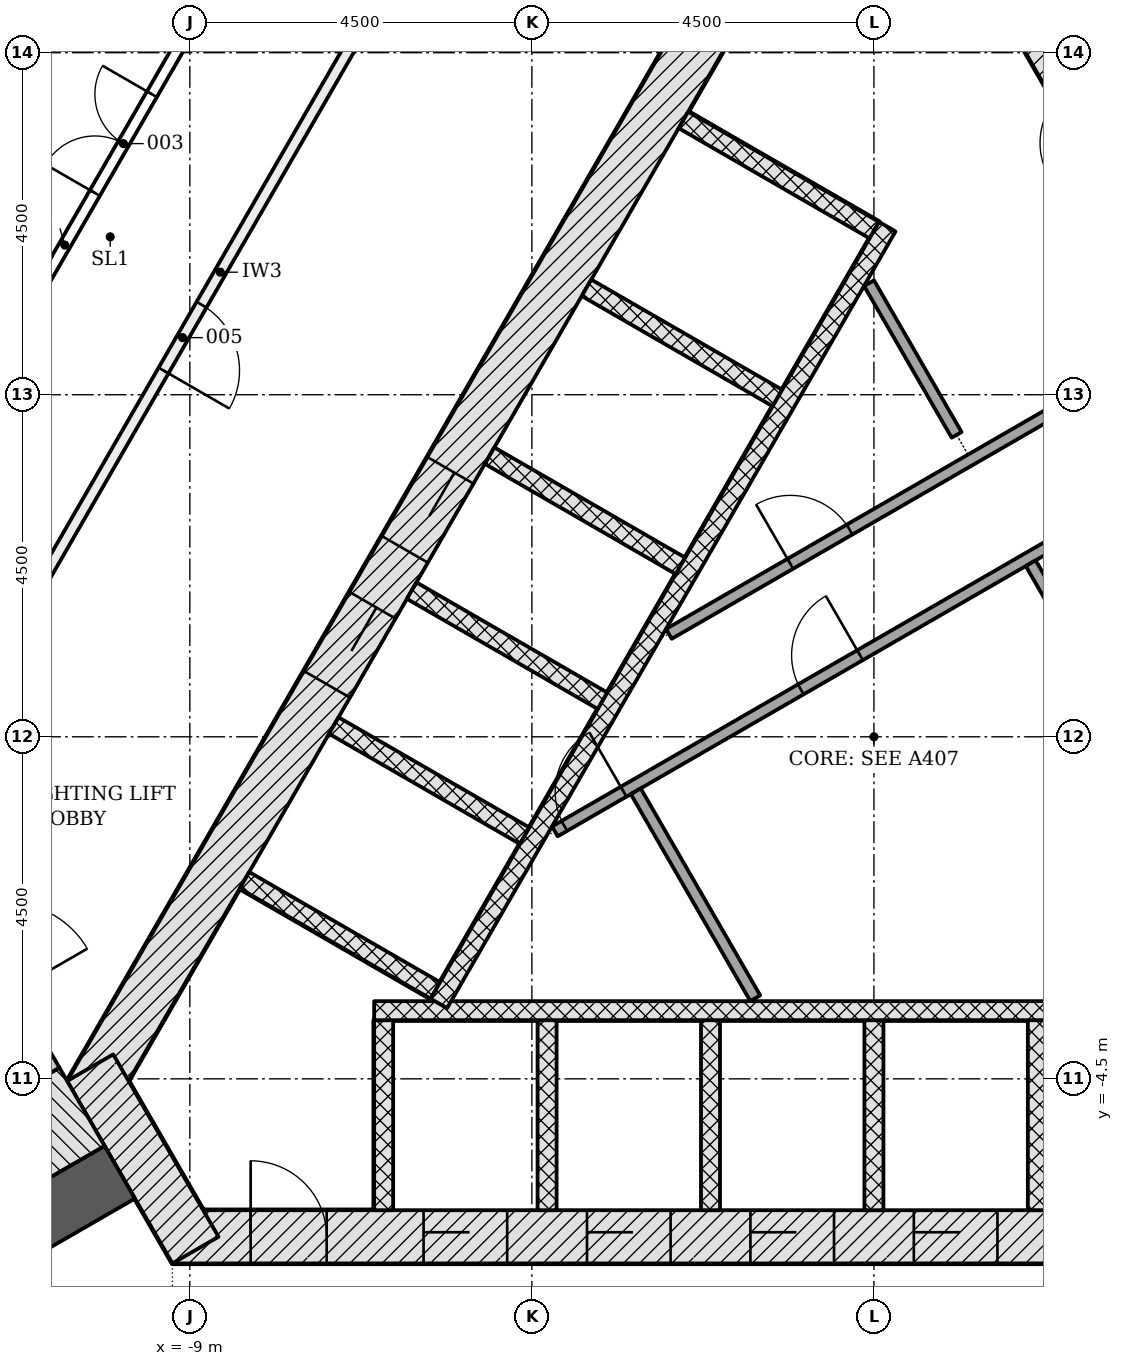
"""IFC4 building model, lengths in metres.
Left out: names, types, materials, properties, quantities, classifications, styles, units other than length and angle.
Written with IfcOpenShell. Run it as: python <this file> out.ifc"""

import sys

from ifc_helpers import new_model, si_unit, direction, frame, frame_2d, origin, place, context, subcontext, project, spatial, polyline, rectangle, outline, extrude, element, fill, save


model = new_model("IFC4")
c1 = context("Model", 3, precision=1e-05, world=origin(), true_north=direction((0.0, 1.0)))
c2 = subcontext(c1, "Body", "Model", "MODEL_VIEW")
j1 = project(units=[si_unit("LENGTHUNIT", "METRE"), si_unit("PLANEANGLEUNIT", "RADIAN")], contexts=[c1])
p1 = place(None, origin())
s1 = spatial("IfcSite", under=j1, at=p1, CompositionType="ELEMENT")
p2 = place(p1, origin())
s2 = spatial("IfcBuilding", under=s1, at=p2, CompositionType="ELEMENT")
p3 = place(p2, frame((0.0, 0.0, 105.9)))
s3 = spatial("IfcBuildingStorey", under=s2, at=p3, CompositionType="ELEMENT", Elevation=105.9)
p4 = place(p3, frame((-9.229, -6.578, -0.2), z_axis=(0.0, 0.0, 1.0), x_axis=(1.0, 0.0, 0.0)))
e1 = element("IfcWall", 1, at=p4, inside=s3, PredefinedType="SHEAR", context=c2, shape_type="SweptSolid", body=[
    extrude(rectangle(XDim=18.458, YDim=0.7, at=frame_2d((9.229, 0.0))), origin(), (0.0, 0.0, 1.0), 3.6),
])
p5 = place(p4, frame((3.304, 0.0, 0.2)))
e2 = element("IfcOpeningElement", 2, at=p5, cuts=e1, PredefinedType="OPENING", context=c2, shape_type="SweptSolid", body=[
    extrude(rectangle(XDim=1.1, YDim=2.1, at=frame_2d((0.55, 1.05))), frame((0.0, 0.36, 0.0), z_axis=(0.0, -1.0, 0.0), x_axis=(1.0, 0.0, 0.0)), (0.0, 0.0, 1.0), 0.72),
])
p6 = place(p4, frame((5.454, 0.0, 0.2)))
e3 = element("IfcOpeningElement", 3, at=p6, cuts=e1, PredefinedType="OPENING", context=c2, shape_type="SweptSolid", body=[
    extrude(rectangle(XDim=1.1, YDim=2.1, at=frame_2d((0.55, 1.05))), frame((0.0, 0.36, 0.0), z_axis=(0.0, -1.0, 0.0), x_axis=(1.0, 0.0, 0.0)), (0.0, 0.0, 1.0), 0.72),
])
p7 = place(p4, frame((7.604, 0.0, 0.2)))
e4 = element("IfcOpeningElement", 4, at=p7, cuts=e1, PredefinedType="OPENING", context=c2, shape_type="SweptSolid", body=[
    extrude(rectangle(XDim=1.1, YDim=2.1, at=frame_2d((0.55, 1.05))), frame((0.0, 0.36, 0.0), z_axis=(0.0, -1.0, 0.0), x_axis=(1.0, 0.0, 0.0)), (0.0, 0.0, 1.0), 0.72),
])
p8 = place(p4, frame((9.754, 0.0, 0.2)))
e5 = element("IfcOpeningElement", 5, at=p8, cuts=e1, PredefinedType="OPENING", context=c2, shape_type="SweptSolid", body=[
    extrude(rectangle(XDim=1.1, YDim=2.1, at=frame_2d((0.55, 1.05))), frame((0.0, 0.36, 0.0), z_axis=(0.0, -1.0, 0.0), x_axis=(1.0, 0.0, 0.0)), (0.0, 0.0, 1.0), 0.72),
])
p9 = place(p4, frame((11.904, 0.0, 0.2)))
e6 = element("IfcOpeningElement", 6, at=p9, cuts=e1, PredefinedType="OPENING", context=c2, shape_type="SweptSolid", body=[
    extrude(rectangle(XDim=1.1, YDim=2.1, at=frame_2d((0.55, 1.05))), frame((0.0, 0.36, 0.0), z_axis=(0.0, -1.0, 0.0), x_axis=(1.0, 0.0, 0.0)), (0.0, 0.0, 1.0), 0.72),
])
p10 = place(p4, frame((14.054, 0.0, 0.2)))
e7 = element("IfcOpeningElement", 7, at=p10, cuts=e1, PredefinedType="OPENING", context=c2, shape_type="SweptSolid", body=[
    extrude(rectangle(XDim=1.1, YDim=2.1, at=frame_2d((0.55, 1.05))), frame((0.0, 0.36, 0.0), z_axis=(0.0, -1.0, 0.0), x_axis=(1.0, 0.0, 0.0)), (0.0, 0.0, 1.0), 0.72),
])
p11 = place(p4, frame((1.029, 0.0, 0.2)))
e8 = element("IfcOpeningElement", 8, at=p11, cuts=e1, PredefinedType="OPENING", context=c2, shape_type="SweptSolid", body=[
    extrude(rectangle(XDim=1.0, YDim=2.1, at=frame_2d((0.5, 1.05))), frame((0.0, 0.36, 0.0), z_axis=(0.0, -1.0, 0.0), x_axis=(1.0, 0.0, 0.0)), (0.0, 0.0, 1.0), 0.72),
])
p12 = place(p3, frame((10.311, -4.703, -0.2), z_axis=(0.0, 0.0, 1.0), x_axis=(-0.500001446645, 0.866024568562, 0.0)))
e9 = element("IfcWall", 9, at=p12, inside=s3, PredefinedType="SHEAR", context=c2, shape_type="SweptSolid", body=[
    extrude(rectangle(XDim=18.458, YDim=0.7, at=frame_2d((9.229, 0.0))), origin(), (0.0, 0.0, 1.0), 3.6),
])
p13 = place(p12, frame((10.5, 0.0, 0.2)))
e10 = element("IfcOpeningElement", 10, at=p13, cuts=e9, PredefinedType="OPENING", context=c2, shape_type="SweptSolid", body=[
    extrude(rectangle(XDim=1.0, YDim=2.1, at=frame_2d((0.5, 1.05))), frame((0.0, 0.36, 0.0), z_axis=(0.0, -1.0, 0.0), x_axis=(1.0, 0.0, 0.0)), (0.0, 0.0, 1.0), 0.72),
])
p14 = place(p12, frame((4.877, 0.0, 0.2)))
e11 = element("IfcOpeningElement", 11, at=p14, cuts=e9, PredefinedType="OPENING", context=c2, shape_type="SweptSolid", body=[
    extrude(rectangle(XDim=0.9, YDim=2.1, at=frame_2d((0.45, 1.05))), frame((0.0, 0.36, 0.0), z_axis=(0.0, -1.0, 0.0), x_axis=(1.0, 0.0, 0.0)), (0.0, 0.0, 1.0), 0.72),
])
p15 = place(p12, frame((14.452, 0.0, 0.2)))
e12 = element("IfcOpeningElement", 12, at=p15, cuts=e9, PredefinedType="OPENING", context=c2, shape_type="SweptSolid", body=[
    extrude(rectangle(XDim=0.9, YDim=2.1, at=frame_2d((0.45, 1.05))), frame((0.0, 0.36, 0.0), z_axis=(0.0, -1.0, 0.0), x_axis=(1.0, 0.0, 0.0)), (0.0, 0.0, 1.0), 0.72),
])
p16 = place(p3, frame((-1.083, 11.281, -0.2), z_axis=(0.0, 0.0, 1.0), x_axis=(-0.500001446645, -0.866024568562, 0.0)))
e13 = element("IfcWall", 13, at=p16, inside=s3, PredefinedType="SHEAR", context=c2, shape_type="SweptSolid", body=[
    extrude(rectangle(XDim=18.458, YDim=0.7, at=frame_2d((9.229, 0.0))), origin(), (0.0, 0.0, 1.0), 3.6),
])
p17 = place(p16, frame((8.979, 0.0, 0.2)))
e14 = element("IfcOpeningElement", 14, at=p17, cuts=e13, PredefinedType="OPENING", context=c2, shape_type="SweptSolid", body=[
    extrude(rectangle(XDim=1.2, YDim=2.1, at=frame_2d((0.6, 1.05))), frame((0.0, 0.36, 0.0), z_axis=(0.0, -1.0, 0.0), x_axis=(1.0, 0.0, 0.0)), (0.0, 0.0, 1.0), 0.72),
])
p18 = place(p16, frame((11.029, 0.0, 0.2)))
e15 = element("IfcOpeningElement", 15, at=p18, cuts=e13, PredefinedType="OPENING", context=c2, shape_type="SweptSolid", body=[
    extrude(rectangle(XDim=1.2, YDim=2.1, at=frame_2d((0.6, 1.05))), frame((0.0, 0.36, 0.0), z_axis=(0.0, -1.0, 0.0), x_axis=(1.0, 0.0, 0.0)), (0.0, 0.0, 1.0), 0.72),
])
p19 = place(p3, frame((-10.311, -4.353, -0.2), z_axis=(0.0, 0.0, 1.0), x_axis=(0.500042739161, -0.866000726912, 0.0)))
e16 = element("IfcWall", 16, at=p19, inside=s3, PredefinedType="SHEAR", context=c2, shape_type="SweptSolid", body=[
    extrude(rectangle(XDim=2.771, YDim=0.7, at=frame_2d((1.386, 0.0))), origin(), (0.0, 0.0, 1.0), 3.6),
])
p20 = place(p3, frame((-9.922, -5.728, -0.2), z_axis=(0.0, 0.0, 1.0), x_axis=(-0.866027307971, -0.499996701837, 0.0)))
e17 = element("IfcWall", 17, at=p20, inside=s3, PredefinedType="SHEAR", context=c2, shape_type="SweptSolid", body=[
    extrude(rectangle(XDim=11.918, YDim=0.8, at=frame_2d((5.959, 0.0))), origin(), (0.0, 0.0, 1.0), 3.6),
])
p21 = place(p3, origin())
e18 = element("IfcWall", 18, at=p21, inside=s3, PredefinedType="PARAPET", context=c2, shape_type="SweptSolid", body=[
    extrude(outline(polyline([(-3.375, 26.953), (-5.966, 28.358), (-8.687, 29.371), (-11.446, 29.958), (-14.148, 30.099), (-16.702, 29.789), (-19.02, 29.039), (-21.024, 27.873), (-22.646, 26.333), (-23.83, 24.469), (-24.536, 22.347), (-24.74, 20.038), (-24.435, 17.62), (-23.631, 15.176), (-22.356, 12.79), (-20.653, 10.542), (-18.58, 8.509), (-16.208, 6.76), (-16.06, 6.961), (-18.418, 8.699), (-20.465, 10.707), (-22.145, 12.925), (-23.4, 15.275), (-24.19, 17.675), (-24.489, 20.042), (-24.29, 22.296), (-23.603, 24.362), (-22.452, 26.173), (-20.873, 27.672), (-18.918, 28.809), (-16.647, 29.544), (-14.139, 29.848), (-11.478, 29.709), (-8.757, 29.13), (-6.07, 28.129), (-3.495, 26.733), (-3.375, 26.953)])), origin(), (0.0, 0.0, 1.0), 1.1),
])
for number, where, z_axis, x_axis in (
    (19, (-6.45, -6.228, -0.2), (0.0, 0.0, 1.0), (0.0, 1.0, 0.0)),
    (20, (-4.3, -6.228, -0.2), (0.0, 0.0, 1.0), (0.0, 1.0, 0.0)),
    (21, (-2.15, -6.228, -0.2), (0.0, 0.0, 1.0), (0.0, 1.0, 0.0)),
    (22, (0.0, -6.228, -0.2), (0.0, 0.0, 1.0), (0.0, 1.0, 0.0)),
    (23, (2.15, -6.228, -0.2), (0.0, 0.0, 1.0), (0.0, 1.0, 0.0)),
):
    element("IfcWall", number, at=place(p3, frame(where, z_axis=z_axis, x_axis=x_axis)), inside=s3, PredefinedType="PARTITIONING", context=c2, shape_type="SweptSolid", body=[
        extrude(rectangle(XDim=2.5, YDim=0.25, at=frame_2d((1.25, 0.0))), origin(), (0.0, 0.0, 1.0), 3.6),
    ])
p22 = place(p3, frame((-6.575, -3.603, 0.0), z_axis=(0.0, 0.0, 1.0), x_axis=(1.0, 0.0, 0.0)))
e24 = element("IfcWall", 24, at=p22, inside=s3, PredefinedType="PARTITIONING", context=c2, shape_type="SweptSolid", body=[
    extrude(rectangle(XDim=13.15, YDim=0.25, at=frame_2d((6.575, 0.0))), origin(), (0.0, 0.0, 1.0), 3.4),
])
p23 = place(p3, frame((-2.506, 8.115, -0.2), z_axis=(0.0, 0.0, 1.0), x_axis=(0.865996321171, -0.50005036918, 0.0)))
e25 = element("IfcWall", 25, at=p23, inside=s3, PredefinedType="PARTITIONING", context=c2, shape_type="SweptSolid", body=[
    extrude(rectangle(XDim=2.9, YDim=0.25, at=frame_2d((1.45, 0.0))), origin(), (0.0, 0.0, 1.0), 3.6),
])
for number, where, z_axis, x_axis in (
    (26, (-3.781, 5.907, -0.2), (0.0, 0.0, 1.0), (0.866, -0.5, 0.0)),
    (27, (-5.056, 3.699, -0.2), (0.0, 0.0, 1.0), (0.866, -0.5, 0.0)),
    (28, (-6.081, 1.923, -0.2), (0.0, 0.0, 1.0), (0.866, -0.5, 0.0)),
    (29, (-7.106, 0.148, -0.2), (0.0, 0.0, 1.0), (0.866, -0.5, 0.0)),
    (30, (-8.281, -1.887, -0.2), (0.0, 0.0, 1.0), (0.866, -0.5, 0.0)),
):
    element("IfcWall", number, at=place(p3, frame(where, z_axis=z_axis, x_axis=x_axis)), inside=s3, PredefinedType="PARTITIONING", context=c2, shape_type="SweptSolid", body=[
        extrude(rectangle(XDim=2.9, YDim=0.25, at=frame_2d((1.45, 0.0))), origin(), (0.0, 0.0, 1.0), 3.6),
    ])
p24 = place(p3, frame((0.176, 6.711, 0.0), z_axis=(0.0, 0.0, 1.0), x_axis=(-0.500004227369, -0.866022963098, 0.0)))
e31 = element("IfcWall", 31, at=p24, inside=s3, PredefinedType="PARTITIONING", context=c2, shape_type="SweptSolid", body=[
    extrude(rectangle(XDim=11.8, YDim=0.25, at=frame_2d((5.9, 0.0))), origin(), (0.0, 0.0, 1.0), 3.4),
])
p25 = place(p3, frame((-4.198, -1.244, 0.0), z_axis=(0.0, 0.0, 1.0), x_axis=(0.866020798945, 0.500007975732, 0.0)))
e32 = element("IfcWall", 32, at=p25, inside=s3, PredefinedType="PARTITIONING", context=c2, shape_type="SweptSolid", body=[
    extrude(rectangle(XDim=10.486, YDim=0.15, at=frame_2d((5.243, 0.0))), origin(), (0.0, 0.0, 1.0), 3.4),
])
p26 = place(p25, frame((3.736, 0.0, 0.0)))
e33 = element("IfcOpeningElement", 33, at=p26, cuts=e32, PredefinedType="OPENING", context=c2, shape_type="SweptSolid", body=[
    extrude(rectangle(XDim=0.9, YDim=2.1, at=frame_2d((0.45, 1.05))), frame((0.0, 0.085, 0.0), z_axis=(0.0, -1.0, 0.0), x_axis=(1.0, 0.0, 0.0)), (0.0, 0.0, 1.0), 0.17),
])
p27 = place(p25, frame((0.144, 0.0, 0.0)))
e34 = element("IfcOpeningElement", 34, at=p27, cuts=e32, PredefinedType="OPENING", context=c2, shape_type="SweptSolid", body=[
    extrude(rectangle(XDim=0.9, YDim=2.1, at=frame_2d((0.45, 1.05))), frame((0.0, 0.085, 0.0), z_axis=(0.0, -1.0, 0.0), x_axis=(1.0, 0.0, 0.0)), (0.0, 0.0, 1.0), 0.17),
])
p28 = place(p3, frame((5.367, -3.439, 0.0), z_axis=(0.0, 0.0, 1.0), x_axis=(-0.499981499682, 0.866036084685, 0.0)))
e35 = element("IfcWall", 35, at=p28, inside=s3, PredefinedType="PARTITIONING", context=c2, shape_type="SweptSolid", body=[
    extrude(rectangle(XDim=6.608, YDim=0.15, at=frame_2d((3.304, 0.0))), origin(), (0.0, 0.0, 1.0), 3.4),
])
p29 = place(p3, frame((-1.561, -3.439, 0.0), z_axis=(0.0, 0.0, 1.0), x_axis=(-0.499989077369, 0.866031709877, 0.0)))
e36 = element("IfcWall", 36, at=p29, inside=s3, PredefinedType="PARTITIONING", context=c2, shape_type="SweptSolid", body=[
    extrude(rectangle(XDim=3.144, YDim=0.15, at=frame_2d((1.572, 0.0))), origin(), (0.0, 0.0, 1.0), 3.4),
])
p30 = place(p3, frame((-2.698, 1.354, 0.0), z_axis=(0.0, 0.0, 1.0), x_axis=(0.866021157486, 0.500007354732, 0.0)))
e37 = element("IfcWall", 37, at=p30, inside=s3, PredefinedType="PARTITIONING", context=c2, shape_type="SweptSolid", body=[
    extrude(rectangle(XDim=7.888, YDim=0.15, at=frame_2d((3.944, 0.0))), origin(), (0.0, 0.0, 1.0), 3.4),
])
p31 = place(p30, frame((1.845, 0.0, 0.0)))
e38 = element("IfcOpeningElement", 38, at=p31, cuts=e37, PredefinedType="OPENING", context=c2, shape_type="SweptSolid", body=[
    extrude(rectangle(XDim=0.9, YDim=2.1, at=frame_2d((0.45, 1.05))), frame((0.0, 0.085, 0.0), z_axis=(0.0, -1.0, 0.0), x_axis=(1.0, 0.0, 0.0)), (0.0, 0.0, 1.0), 0.17),
])
p32 = place(p3, frame((1.088, 3.972, 0.0), z_axis=(0.0, 0.0, 1.0), x_axis=(-0.500116913307, 0.865957893332, 0.0)))
e39 = element("IfcWall", 39, at=p32, inside=s3, PredefinedType="PARTITIONING", context=c2, shape_type="SweptSolid", body=[
    extrude(rectangle(XDim=2.304, YDim=0.15, at=frame_2d((1.152, 0.0))), origin(), (0.0, 0.0, 1.0), 3.4),
])
p33 = place(p3, frame((-12.576, -1.331, -0.2), z_axis=(0.0, 0.0, 1.0), x_axis=(0.499970499736, -0.8660424351, 0.0)))
e40 = element("IfcWall", 40, at=p33, inside=s3, PredefinedType="SHEAR", context=c2, shape_type="SweptSolid", body=[
    extrude(rectangle(XDim=3.55, YDim=0.2, at=frame_2d((1.775, 0.0))), origin(), (0.0, 0.0, 1.0), 3.6),
])
p34 = place(p33, frame((1.175, 0.0, 0.2)))
e41 = element("IfcOpeningElement", 41, at=p34, cuts=e40, PredefinedType="OPENING", context=c2, shape_type="SweptSolid", body=[
    extrude(rectangle(XDim=1.2, YDim=2.1, at=frame_2d((0.6, 1.05))), frame((0.0, 0.11, 0.0), z_axis=(0.0, -1.0, 0.0), x_axis=(1.0, 0.0, 0.0)), (0.0, 0.0, 1.0), 0.22),
])
p35 = place(p3, frame((-10.418, -4.868, -0.2), z_axis=(0.0, 0.0, 1.0), x_axis=(-0.866018442252, -0.500012057535, 0.0)))
e42 = element("IfcWall", 42, at=p35, inside=s3, PredefinedType="SHEAR", context=c2, shape_type="SweptSolid", body=[
    extrude(rectangle(XDim=7.2, YDim=1.186, at=frame_2d((3.6, 0.0))), origin(), (0.0, 0.0, 1.0), 3.6),
])
p36 = place(p3, frame((-16.169, -3.099, 0.0), z_axis=(0.0, 0.0, 1.0), x_axis=(0.499999805269, 0.866025516212, 0.0)))
e43 = element("IfcWall", 43, at=p36, inside=s3, PredefinedType="PARTITIONING", context=c2, shape_type="SweptSolid", body=[
    extrude(rectangle(XDim=22.097, YDim=0.15, at=frame_2d((11.049, 0.0))), origin(), (0.0, 0.0, 1.0), 2.847),
])
p37 = place(p36, frame((17.776, 0.0, 0.0)))
e44 = element("IfcOpeningElement", 44, at=p37, cuts=e43, PredefinedType="OPENING", context=c2, shape_type="SweptSolid", body=[
    extrude(rectangle(XDim=1.0, YDim=2.1, at=frame_2d((0.5, 1.05))), frame((0.0, 0.085, 0.0), z_axis=(0.0, -1.0, 0.0), x_axis=(1.0, 0.0, 0.0)), (0.0, 0.0, 1.0), 0.17),
])
p38 = place(p36, frame((15.186, 0.0, 0.0)))
e45 = element("IfcOpeningElement", 45, at=p38, cuts=e43, PredefinedType="OPENING", context=c2, shape_type="SweptSolid", body=[
    extrude(rectangle(XDim=1.0, YDim=2.1, at=frame_2d((0.5, 1.05))), frame((0.0, 0.085, 0.0), z_axis=(0.0, -1.0, 0.0), x_axis=(1.0, 0.0, 0.0)), (0.0, 0.0, 1.0), 0.17),
])
p39 = place(p36, frame((11.84, 0.0, 0.0)))
e46 = element("IfcOpeningElement", 46, at=p39, cuts=e43, PredefinedType="OPENING", context=c2, shape_type="SweptSolid", body=[
    extrude(rectangle(XDim=1.5, YDim=2.1, at=frame_2d((0.75, 1.05))), frame((0.0, 0.085, 0.0), z_axis=(0.0, -1.0, 0.0), x_axis=(1.0, 0.0, 0.0)), (0.0, 0.0, 1.0), 0.17),
])
p40 = place(p36, frame((4.503, 0.0, 0.0)))
e47 = element("IfcOpeningElement", 47, at=p40, cuts=e43, PredefinedType="OPENING", context=c2, shape_type="SweptSolid", body=[
    extrude(rectangle(XDim=1.5, YDim=2.1, at=frame_2d((0.75, 1.05))), frame((0.0, 0.085, 0.0), z_axis=(0.0, -1.0, 0.0), x_axis=(1.0, 0.0, 0.0)), (0.0, 0.0, 1.0), 0.17),
])
p41 = place(p3, frame((-4.407, 13.374, 0.0), z_axis=(0.0, 0.0, 1.0), x_axis=(-0.499997181693, -0.866027030928, 0.0)))
e48 = element("IfcWall", 48, at=p41, inside=s3, PredefinedType="PARTITIONING", context=c2, shape_type="SweptSolid", body=[
    extrude(rectangle(XDim=16.77, YDim=0.15, at=frame_2d((8.385, 0.0))), origin(), (0.0, 0.0, 1.0), 2.847),
])
p42 = place(p41, frame((8.879, 0.0, 0.0)))
e49 = element("IfcOpeningElement", 49, at=p42, cuts=e48, PredefinedType="OPENING", context=c2, shape_type="SweptSolid", body=[
    extrude(rectangle(XDim=1.0, YDim=2.1, at=frame_2d((0.5, 1.05))), frame((0.0, 0.085, 0.0), z_axis=(0.0, -1.0, 0.0), x_axis=(1.0, 0.0, 0.0)), (0.0, 0.0, 1.0), 0.17),
])
p43 = place(p3, frame((-11.345, -7.012, 0.0), z_axis=(0.0, 0.0, 1.0), x_axis=(0.499998569178, -0.866026229868, 0.0)))
e50 = element("IfcWall", 50, at=p43, inside=s3, PredefinedType="PARTITIONING", context=c2, shape_type="SweptSolid", body=[
    extrude(rectangle(XDim=2.143, YDim=0.15, at=frame_2d((1.072, 0.0))), origin(), (0.0, 0.0, 1.0), 3.4),
])
p44 = place(p5, origin())
e51 = element("IfcDoor", 51, at=p44, inside=s3, OperationType="DOUBLE_DOOR_SLIDING", PredefinedType="DOOR", context=c2, shape_type="SweptSolid", body=[
    extrude(rectangle(XDim=1.1, YDim=2.1, at=frame_2d((0.55, 1.05))), frame((0.0, 0.025, 0.0), z_axis=(0.0, -1.0, 0.0), x_axis=(1.0, 0.0, 0.0)), (0.0, 0.0, 1.0), 0.05),
])
fill(e2, e51)
p45 = place(p6, origin())
e52 = element("IfcDoor", 52, at=p45, inside=s3, OperationType="DOUBLE_DOOR_SLIDING", PredefinedType="DOOR", context=c2, shape_type="SweptSolid", body=[
    extrude(rectangle(XDim=1.1, YDim=2.1, at=frame_2d((0.55, 1.05))), frame((0.0, 0.025, 0.0), z_axis=(0.0, -1.0, 0.0), x_axis=(1.0, 0.0, 0.0)), (0.0, 0.0, 1.0), 0.05),
])
fill(e3, e52)
p46 = place(p7, origin())
e53 = element("IfcDoor", 53, at=p46, inside=s3, OperationType="DOUBLE_DOOR_SLIDING", PredefinedType="DOOR", context=c2, shape_type="SweptSolid", body=[
    extrude(rectangle(XDim=1.1, YDim=2.1, at=frame_2d((0.55, 1.05))), frame((0.0, 0.025, 0.0), z_axis=(0.0, -1.0, 0.0), x_axis=(1.0, 0.0, 0.0)), (0.0, 0.0, 1.0), 0.05),
])
fill(e4, e53)
p47 = place(p8, origin())
e54 = element("IfcDoor", 54, at=p47, inside=s3, OperationType="DOUBLE_DOOR_SLIDING", PredefinedType="DOOR", context=c2, shape_type="SweptSolid", body=[
    extrude(rectangle(XDim=1.1, YDim=2.1, at=frame_2d((0.55, 1.05))), frame((0.0, 0.025, 0.0), z_axis=(0.0, -1.0, 0.0), x_axis=(1.0, 0.0, 0.0)), (0.0, 0.0, 1.0), 0.05),
])
fill(e5, e54)
p48 = place(p17, origin())
e55 = element("IfcDoor", 55, at=p48, inside=s3, OperationType="DOUBLE_DOOR_SLIDING", PredefinedType="DOOR", context=c2, shape_type="SweptSolid", body=[
    extrude(rectangle(XDim=1.2, YDim=2.1, at=frame_2d((0.6, 1.05))), frame((0.0, 0.025, 0.0), z_axis=(0.0, -1.0, 0.0), x_axis=(1.0, 0.0, 0.0)), (0.0, 0.0, 1.0), 0.05),
])
fill(e14, e55)
p49 = place(p18, origin())
e56 = element("IfcDoor", 56, at=p49, inside=s3, OperationType="DOUBLE_DOOR_SLIDING", PredefinedType="DOOR", context=c2, shape_type="SweptSolid", body=[
    extrude(rectangle(XDim=1.2, YDim=2.1, at=frame_2d((0.6, 1.05))), frame((0.0, 0.025, 0.0), z_axis=(0.0, -1.0, 0.0), x_axis=(1.0, 0.0, 0.0)), (0.0, 0.0, 1.0), 0.05),
])
fill(e15, e56)
p50 = place(p26, origin())
e57 = element("IfcDoor", 57, at=p50, inside=s3, OperationType="SINGLE_SWING_RIGHT", PredefinedType="DOOR", context=c2, shape_type="SweptSolid", body=[
    extrude(rectangle(XDim=0.9, YDim=2.1, at=frame_2d((0.45, 1.05))), frame((0.0, 0.025, 0.0), z_axis=(0.0, -1.0, 0.0), x_axis=(1.0, 0.0, 0.0)), (0.0, 0.0, 1.0), 0.05),
])
fill(e33, e57)
p51 = place(p31, origin())
e58 = element("IfcDoor", 58, at=p51, inside=s3, OperationType="SINGLE_SWING_LEFT", PredefinedType="DOOR", context=c2, shape_type="SweptSolid", body=[
    extrude(rectangle(XDim=0.9, YDim=2.1, at=frame_2d((0.45, 1.05))), frame((0.0, 0.025, 0.0), z_axis=(0.0, -1.0, 0.0), x_axis=(1.0, 0.0, 0.0)), (0.0, 0.0, 1.0), 0.05),
])
fill(e38, e58)
p52 = place(p27, origin())
e59 = element("IfcDoor", 59, at=p52, inside=s3, OperationType="SINGLE_SWING_RIGHT", PredefinedType="DOOR", context=c2, shape_type="SweptSolid", body=[
    extrude(rectangle(XDim=0.9, YDim=2.1, at=frame_2d((0.45, 1.05))), frame((0.0, 0.025, 0.0), z_axis=(0.0, -1.0, 0.0), x_axis=(1.0, 0.0, 0.0)), (0.0, 0.0, 1.0), 0.05),
])
fill(e34, e59)
p53 = place(p11, origin())
e60 = element("IfcDoor", 60, at=p53, inside=s3, OperationType="SINGLE_SWING_LEFT", PredefinedType="DOOR", context=c2, shape_type="SweptSolid", body=[
    extrude(rectangle(XDim=1.0, YDim=2.1, at=frame_2d((0.5, 1.05))), frame((0.0, 0.075, 0.0), z_axis=(0.0, -1.0, 0.0), x_axis=(1.0, 0.0, 0.0)), (0.0, 0.0, 1.0), 0.15),
])
fill(e8, e60)
p54 = place(p39, origin())
e61 = element("IfcDoor", 61, at=p54, inside=s3, OperationType="DOUBLE_DOOR_SINGLE_SWING", PredefinedType="DOOR", context=c2, shape_type="SweptSolid", body=[
    extrude(rectangle(XDim=1.5, YDim=2.1, at=frame_2d((0.75, 1.05))), frame((0.0, 0.025, 0.0), z_axis=(0.0, -1.0, 0.0), x_axis=(1.0, 0.0, 0.0)), (0.0, 0.0, 1.0), 0.05),
])
fill(e46, e61)
p55 = place(p42, origin())
e62 = element("IfcDoor", 62, at=p55, inside=s3, OperationType="SINGLE_SWING_RIGHT", PredefinedType="DOOR", context=c2, shape_type="SweptSolid", body=[
    extrude(rectangle(XDim=1.0, YDim=2.1, at=frame_2d((0.5, 1.05))), frame((0.0, 0.025, 0.0), z_axis=(0.0, -1.0, 0.0), x_axis=(1.0, 0.0, 0.0)), (0.0, 0.0, 1.0), 0.05),
])
fill(e49, e62)
save(model, sys.argv[1])
